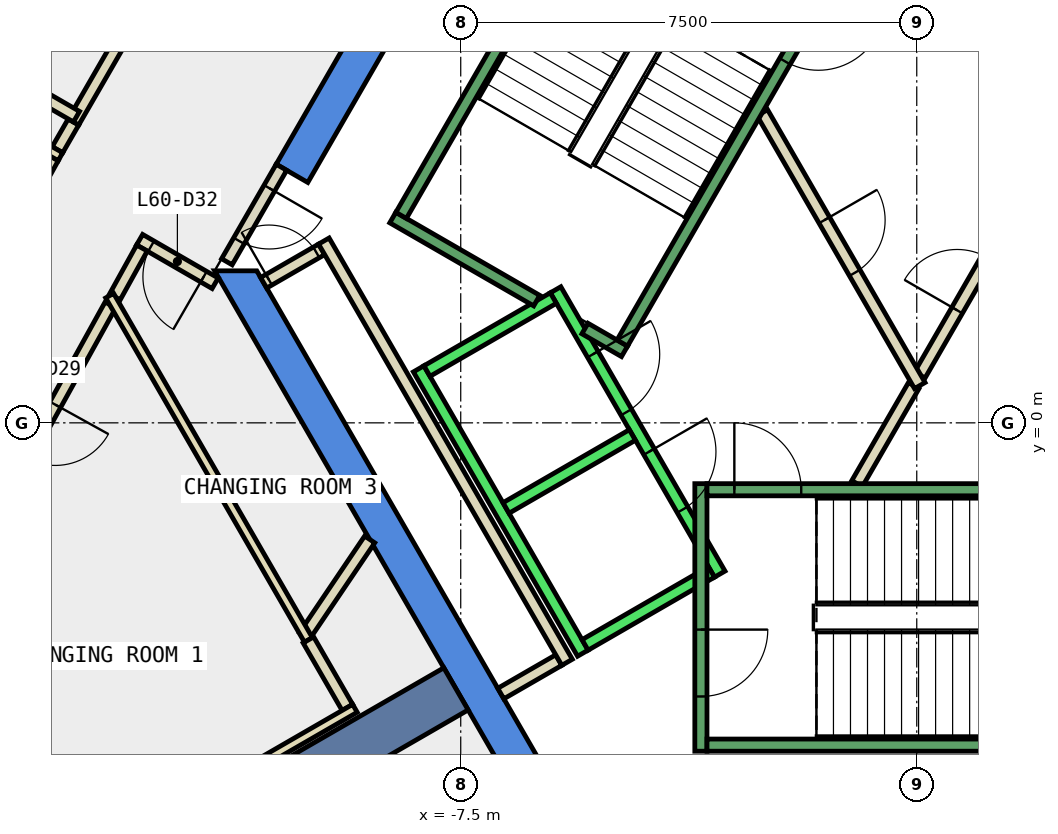
"""IFC4 building model, lengths in metres.
Left out: names, types, materials, properties, quantities, classifications, styles, units other than length and angle.
Written with IfcOpenShell. Run it as: python <this file> out.ifc"""

import sys

from ifc_helpers import new_model, si_unit, direction, frame, frame_2d, origin, place, context, subcontext, project, spatial, polyline, rectangle, outline, extrude, element, fill, save


model = new_model("IFC4")
c1 = context("Model", 3, precision=1e-05, world=origin(), true_north=direction((0.0, 1.0)))
c2 = subcontext(c1, "Body", "Model", "MODEL_VIEW")
j1 = project(units=[si_unit("LENGTHUNIT", "METRE"), si_unit("PLANEANGLEUNIT", "RADIAN")], contexts=[c1])
p1 = place(None, origin())
s1 = spatial("IfcSite", under=j1, at=p1, CompositionType="ELEMENT")
p2 = place(p1, origin())
s2 = spatial("IfcBuilding", under=s1, at=p2, CompositionType="ELEMENT")
p3 = place(p2, frame((0.0, 0.0, 263.0)))
s3 = spatial("IfcBuildingStorey", under=s2, at=p3, CompositionType="ELEMENT", Elevation=263.0)
p4 = place(p3, frame((0.0, 0.0, -0.34)))
e1 = element("IfcWall", 1, at=p4, inside=s3, PredefinedType="SHEAR", context=c2, shape_type="SweptSolid", body=[
    extrude(outline(polyline([(-10.535, 4.253), (-10.015, 3.953), (-5.427, 11.9), (-5.774, 12.5), (-10.535, 4.253)])), origin(), (0.0, 0.0, 1.0), 3.6),
])
p5 = place(p3, frame((0.0, 0.0, -0.34)))
e2 = element("IfcWall", 2, at=p5, inside=s3, PredefinedType="SHEAR", context=c2, shape_type="SweptSolid", body=[
    extrude(outline(polyline([(-11.547, 2.5), (-5.774, -7.5), (-5.427, -6.9), (-10.854, 2.5), (-11.547, 2.5)])), origin(), (0.0, 0.0, 1.0), 3.6),
])
p6 = place(p3, frame((-7.578, -4.375, -0.34), z_axis=(0.0, 0.0, 1.0), x_axis=(-0.866024315419, -0.5000018851, 0.0)))
e3 = element("IfcWall", 3, at=p6, inside=s3, PredefinedType="SHEAR", context=c2, shape_type="SweptSolid", body=[
    extrude(rectangle(XDim=9.0, YDim=0.8, at=frame_2d((4.5, 0.0))), origin(), (0.0, 0.0, 1.0), 3.6),
])
p7 = place(p3, frame((-11.539, 2.295, 0.0), z_axis=(0.0, 0.0, 1.0), x_axis=(-0.866023989838, 0.500002449018, 0.0)))
e4 = element("IfcWall", 4, at=p7, inside=s3, PredefinedType="PARTITIONING", context=c2, shape_type="SweptSolid", body=[
    extrude(rectangle(XDim=1.434, YDim=0.2, at=frame_2d((0.717, 0.0))), origin(), (0.0, 0.0, 1.0), 3.26),
])
p8 = place(p7, frame((0.217, 0.0, 0.0)))
e5 = element("IfcOpeningElement", 5, at=p8, cuts=e4, PredefinedType="OPENING", context=c2, shape_type="SweptSolid", body=[
    extrude(rectangle(XDim=1.0, YDim=2.1, at=frame_2d((0.5, 1.05))), frame((0.0, 0.11, 0.0), z_axis=(0.0, -1.0, 0.0), x_axis=(1.0, 0.0, 0.0)), (0.0, 0.0, 1.0), 0.22),
])
p9 = place(p3, frame((-12.743, 2.875, 0.0), z_axis=(0.0, 0.0, 1.0), x_axis=(-0.484334040176, -0.8748831565, 0.0)))
e6 = element("IfcWall", 6, at=p9, inside=s3, PredefinedType="PARTITIONING", context=c2, shape_type="SweptSolid", body=[
    extrude(rectangle(XDim=0.919, YDim=0.2, at=frame_2d((0.459, 0.0))), origin(), (0.0, 0.0, 1.0), 3.26),
])
p10 = place(p3, frame((-13.261, 1.939, 0.0), z_axis=(0.0, 0.0, 1.0), x_axis=(-0.484323615817, -0.874888927329, 0.0)))
e7 = element("IfcWall", 7, at=p10, inside=s3, PredefinedType="PARTITIONING", context=c2, shape_type="SweptSolid", body=[
    extrude(rectangle(XDim=4.747, YDim=0.2, at=frame_2d((2.374, 0.0))), origin(), (0.0, 0.0, 1.0), 3.26),
])
p11 = place(p10, frame((1.874, 0.0, 0.0)))
e8 = element("IfcOpeningElement", 8, at=p11, cuts=e7, PredefinedType="OPENING", context=c2, shape_type="SweptSolid", body=[
    extrude(rectangle(XDim=1.0, YDim=2.1, at=frame_2d((0.5, 1.05))), frame((0.0, 0.11, 0.0), z_axis=(0.0, -1.0, 0.0), x_axis=(1.0, 0.0, 0.0)), (0.0, 0.0, 1.0), 0.22),
])
p12 = place(p3, frame((-14.132, 4.492, 0.0), z_axis=(0.0, 0.0, 1.0), x_axis=(0.499829488579, 0.86612382622, 0.0)))
e9 = element("IfcWall", 9, at=p12, inside=s3, PredefinedType="PARTITIONING", context=c2, shape_type="SweptSolid", body=[
    extrude(rectangle(XDim=0.527, YDim=0.2, at=frame_2d((0.263, 0.0))), origin(), (0.0, 0.0, 1.0), 3.26),
])
p13 = place(p3, frame((-13.869, 4.948, 0.0), z_axis=(0.0, 0.0, 1.0), x_axis=(0.49994636267, 0.866056369097, 0.0)))
e10 = element("IfcWall", 10, at=p13, inside=s3, PredefinedType="PARTITIONING", context=c2, shape_type="SweptSolid", body=[
    extrude(rectangle(XDim=2.8, YDim=0.2, at=frame_2d((1.4, 0.0))), origin(), (0.0, 0.0, 1.0), 3.26),
])
p14 = place(p3, frame((-15.671, 1.714, 0.0), z_axis=(0.0, 0.0, 1.0), x_axis=(0.484203367026, 0.874955484216, 0.0)))
e11 = element("IfcWall", 11, at=p14, inside=s3, PredefinedType="PARTITIONING", context=c2, shape_type="SweptSolid", body=[
    extrude(rectangle(XDim=3.025, YDim=0.2, at=frame_2d((1.513, 0.0))), origin(), (0.0, 0.0, 1.0), 3.26),
])
p15 = place(p14, frame((1.013, 0.0, 0.0)))
e12 = element("IfcOpeningElement", 12, at=p15, cuts=e11, PredefinedType="OPENING", context=c2, shape_type="SweptSolid", body=[
    extrude(rectangle(XDim=1.0, YDim=2.1, at=frame_2d((0.5, 1.05))), frame((0.0, 0.11, 0.0), z_axis=(0.0, -1.0, 0.0), x_axis=(1.0, 0.0, 0.0)), (0.0, 0.0, 1.0), 0.22),
])
p16 = place(p3, frame((-5.888, -3.902, 0.0), z_axis=(0.0, 0.0, 1.0), x_axis=(-0.86621513555, -0.499671230855, 0.0)))
e13 = element("IfcWall", 13, at=p16, inside=s3, PredefinedType="PARTITIONING", context=c2, shape_type="SweptSolid", body=[
    extrude(rectangle(XDim=1.1, YDim=0.2, at=frame_2d((0.55, 0.0))), origin(), (0.0, 0.0, 1.0), 3.26),
])
p17 = place(p3, frame((-10.741, 2.303, 0.0), z_axis=(0.0, 0.0, 1.0), x_axis=(0.866063652425, 0.499933745558, 0.0)))
e14 = element("IfcWall", 14, at=p17, inside=s3, PredefinedType="PARTITIONING", context=c2, shape_type="SweptSolid", body=[
    extrude(rectangle(XDim=1.1, YDim=0.2, at=frame_2d((0.55, 0.0))), origin(), (0.0, 0.0, 1.0), 3.26),
])
p18 = place(p17, frame((0.1, 0.0, 0.0)))
e15 = element("IfcOpeningElement", 15, at=p18, cuts=e14, PredefinedType="OPENING", context=c2, shape_type="SweptSolid", body=[
    extrude(rectangle(XDim=0.9, YDim=2.1, at=frame_2d((0.45, 1.05))), frame((0.0, 0.11, 0.0), z_axis=(0.0, -1.0, 0.0), x_axis=(1.0, 0.0, 0.0)), (0.0, 0.0, 1.0), 0.22),
])
p19 = place(p3, frame((-9.751, 2.99, 0.0), z_axis=(0.0, 0.0, 1.0), x_axis=(0.500012163284, -0.866018381195, 0.0)))
e16 = element("IfcWall", 16, at=p19, inside=s3, PredefinedType="PARTITIONING", context=c2, shape_type="SweptSolid", body=[
    extrude(rectangle(XDim=8.0, YDim=0.2, at=frame_2d((4.0, 0.0))), origin(), (0.0, 0.0, 1.0), 3.26),
])
p20 = place(p3, frame((-10.069, -3.504, 0.0), z_axis=(0.0, 0.0, 1.0), x_axis=(0.559779346026, 0.828641710127, 0.0)))
e17 = element("IfcWall", 17, at=p20, inside=s3, PredefinedType="PARTITIONING", context=c2, shape_type="SweptSolid", body=[
    extrude(rectangle(XDim=1.915, YDim=0.2, at=frame_2d((0.958, 0.0))), origin(), (0.0, 0.0, 1.0), 3.26),
])
p21 = place(p3, frame((-13.274, 2.092, 0.0), z_axis=(0.0, 0.0, 1.0), x_axis=(0.500002592159, -0.866023907196, 0.0)))
e18 = element("IfcWall", 18, at=p21, inside=s3, PredefinedType="PARTITIONING", context=c2, shape_type="SweptSolid", body=[
    extrude(rectangle(XDim=6.538, YDim=0.15, at=frame_2d((3.269, 0.0))), origin(), (0.0, 0.0, 1.0), 3.26),
])
p22 = place(p3, frame((-0.982, -1.0, 0.0), z_axis=(0.0, 0.0, 1.0), x_axis=(0.50024047865, 0.865886518847, 0.0)))
e19 = element("IfcWall", 19, at=p22, inside=s3, PredefinedType="PARTITIONING", context=c2, shape_type="SweptSolid", body=[
    extrude(rectangle(XDim=1.863, YDim=0.2, at=frame_2d((0.931, 0.0))), origin(), (0.0, 0.0, 1.0), 3.26),
])
p23 = place(p3, frame((0.05, 0.787, 0.0), z_axis=(0.0, 0.0, 1.0), x_axis=(0.499954076797, 0.866051915934, 0.0)))
e20 = element("IfcWall", 20, at=p23, inside=s3, PredefinedType="PARTITIONING", context=c2, shape_type="SweptSolid", body=[
    extrude(rectangle(XDim=3.558, YDim=0.2, at=frame_2d((1.779, 0.0))), origin(), (0.0, 0.0, 1.0), 3.26),
])
p24 = place(p23, frame((1.229, 0.0, 0.0)))
e21 = element("IfcOpeningElement", 21, at=p24, cuts=e20, PredefinedType="OPENING", context=c2, shape_type="SweptSolid", body=[
    extrude(rectangle(XDim=1.0, YDim=2.1, at=frame_2d((0.5, 1.05))), frame((0.0, 0.11, 0.0), z_axis=(0.0, -1.0, 0.0), x_axis=(1.0, 0.0, 0.0)), (0.0, 0.0, 1.0), 0.22),
])
p25 = place(p3, frame((-2.54, 5.1, 0.0), z_axis=(0.0, 0.0, 1.0), x_axis=(0.499925051871, -0.866068670783, 0.0)))
e22 = element("IfcWall", 22, at=p25, inside=s3, PredefinedType="PARTITIONING", context=c2, shape_type="SweptSolid", body=[
    extrude(rectangle(XDim=5.181, YDim=0.2, at=frame_2d((2.59, 0.0))), origin(), (0.0, 0.0, 1.0), 3.26),
])
p26 = place(p25, frame((2.04, 0.0, 0.0)))
e23 = element("IfcOpeningElement", 23, at=p26, cuts=e22, PredefinedType="OPENING", context=c2, shape_type="SweptSolid", body=[
    extrude(rectangle(XDim=1.0, YDim=2.1, at=frame_2d((0.5, 1.05))), frame((0.0, 0.11, 0.0), z_axis=(0.0, -1.0, 0.0), x_axis=(1.0, 0.0, 0.0)), (0.0, 0.0, 1.0), 0.22),
])
p27 = place(p3, frame((-9.364, -4.68, 0.0), z_axis=(0.0, 0.0, 1.0), x_axis=(-0.500052244015, 0.865995238587, 0.0)))
e24 = element("IfcWall", 24, at=p27, inside=s3, PredefinedType="PARTITIONING", context=c2, shape_type="SweptSolid", body=[
    extrude(rectangle(XDim=1.281, YDim=0.2, at=frame_2d((0.641, 0.0))), origin(), (0.0, 0.0, 1.0), 3.26),
])
p28 = place(p3, frame((-9.24, -4.695, 0.0), z_axis=(0.0, 0.0, 1.0), x_axis=(-0.866015037582, -0.500017954359, 0.0)))
e25 = element("IfcWall", 25, at=p28, inside=s3, PredefinedType="PARTITIONING", context=c2, shape_type="SweptSolid", body=[
    extrude(rectangle(XDim=7.176, YDim=0.15, at=frame_2d((3.588, 0.0))), origin(), (0.0, 0.0, 1.0), 3.26),
])
p29 = place(p3, frame((-15.984, 6.285, 0.0), z_axis=(0.0, 0.0, 1.0), x_axis=(0.865998541277, -0.500046524342, 0.0)))
e26 = element("IfcWall", 26, at=p29, inside=s3, PredefinedType="PARTITIONING", context=c2, shape_type="SweptSolid", body=[
    extrude(rectangle(XDim=2.5, YDim=0.2, at=frame_2d((1.25, 0.0))), origin(), (0.0, 0.0, 1.0), 3.26),
])
p30 = place(p3, frame((-14.083, 4.377, 0.0), z_axis=(0.0, 0.0, 1.0), x_axis=(-0.870415885751, 0.492317159799, 0.0)))
e27 = element("IfcWall", 27, at=p30, inside=s3, PredefinedType="PARTITIONING", context=c2, shape_type="SweptSolid", body=[
    extrude(rectangle(XDim=4.581, YDim=0.15, at=frame_2d((2.29, 0.0))), origin(), (0.0, 0.0, 1.0), 3.26),
])
p31 = place(p3, frame((-10.449, 4.203, 0.0), z_axis=(0.0, 0.0, 1.0), x_axis=(-0.499914839587, -0.866074565589, 0.0)))
e28 = element("IfcWall", 28, at=p31, inside=s3, PredefinedType="PARTITIONING", context=c2, shape_type="SweptSolid", body=[
    extrude(rectangle(XDim=1.794, YDim=0.2, at=frame_2d((0.897, 0.0))), origin(), (0.0, 0.0, 1.0), 2.4),
])
p32 = place(p31, frame((0.397, 0.0, 0.0)))
e29 = element("IfcOpeningElement", 29, at=p32, cuts=e28, PredefinedType="OPENING", context=c2, shape_type="SweptSolid", body=[
    extrude(rectangle(XDim=1.0, YDim=2.1, at=frame_2d((0.5, 1.05))), frame((0.0, 0.11, 0.0), z_axis=(0.0, -1.0, 0.0), x_axis=(1.0, 0.0, 0.0)), (0.0, 0.0, 1.0), 0.22),
])
p33 = place(p3, frame((-5.94, 2.188, 0.0), z_axis=(0.0, 0.0, 1.0), x_axis=(0.500034260056, -0.866005622828, 0.0)))
e30 = element("IfcWall", 30, at=p33, inside=s3, PredefinedType="STANDARD", context=c2, shape_type="SweptSolid", body=[
    extrude(rectangle(XDim=5.399, YDim=0.2, at=frame_2d((2.7, 0.0))), origin(), (0.0, 0.0, 1.0), 3.26),
])
p34 = place(p33, frame((3.075, 0.0, 0.0)))
e31 = element("IfcOpeningElement", 31, at=p34, cuts=e30, PredefinedType="OPENING", context=c2, shape_type="SweptSolid", body=[
    extrude(rectangle(XDim=1.1, YDim=2.1, at=frame_2d((0.55, 1.05))), frame((0.0, 0.11, 0.0), z_axis=(0.0, -1.0, 0.0), x_axis=(1.0, 0.0, 0.0)), (0.0, 0.0, 1.0), 0.22),
])
p35 = place(p33, frame((1.225, 0.0, 0.0)))
e32 = element("IfcOpeningElement", 32, at=p35, cuts=e30, PredefinedType="OPENING", context=c2, shape_type="SweptSolid", body=[
    extrude(rectangle(XDim=1.1, YDim=2.1, at=frame_2d((0.55, 1.05))), frame((0.0, 0.11, 0.0), z_axis=(0.0, -1.0, 0.0), x_axis=(1.0, 0.0, 0.0)), (0.0, 0.0, 1.0), 0.22),
])
p36 = place(p3, frame((-8.192, 0.888, 0.0), z_axis=(0.0, 0.0, 1.0), x_axis=(0.500034260056, -0.866005622828, 0.0)))
e33 = element("IfcWall", 33, at=p36, inside=s3, PredefinedType="STANDARD", context=c2, shape_type="SweptSolid", body=[
    extrude(rectangle(XDim=5.399, YDim=0.2, at=frame_2d((2.7, 0.0))), origin(), (0.0, 0.0, 1.0), 3.26),
])
for number, where, z_axis, x_axis in (
    (34, (-5.977, 2.052, 0.0), (0.0, 0.0, 1.0), (-0.866, -0.5, 0.0)),
    (35, (-4.677, -0.2, 0.0), (0.0, 0.0, 1.0), (-0.866, -0.5, 0.0)),
):
    element("IfcWall", number, at=place(p3, frame(where, z_axis=z_axis, x_axis=x_axis)), inside=s3, PredefinedType="STANDARD", context=c2, shape_type="SweptSolid", body=[
        extrude(rectangle(XDim=2.399, YDim=0.2, at=frame_2d((1.2, 0.0))), origin(), (0.0, 0.0, 1.0), 3.26),
    ])
p37 = place(p3, frame((-3.377, -2.452, 0.0), z_axis=(0.0, 0.0, 1.0), x_axis=(-0.865955154139, -0.50012165622, 0.0)))
e36 = element("IfcWall", 36, at=p37, inside=s3, PredefinedType="STANDARD", context=c2, shape_type="SweptSolid", body=[
    extrude(rectangle(XDim=2.4, YDim=0.2, at=frame_2d((1.2, 0.0))), origin(), (0.0, 0.0, 1.0), 3.26),
])
p38 = place(p3, frame((-3.55, -1.0, 0.0), z_axis=(0.0, 0.0, 1.0), x_axis=(0.0, -1.0, 0.0)))
e37 = element("IfcWall", 37, at=p38, inside=s3, PredefinedType="STANDARD", context=c2, shape_type="SweptSolid", body=[
    extrude(rectangle(XDim=4.4, YDim=0.2, at=frame_2d((2.2, 0.0))), origin(), (0.0, 0.0, 1.0), 3.26),
])
p39 = place(p38, frame((2.4, 0.0, 0.0)))
e38 = element("IfcOpeningElement", 38, at=p39, cuts=e37, PredefinedType="OPENING", context=c2, shape_type="SweptSolid", body=[
    extrude(rectangle(XDim=1.1, YDim=2.2, at=frame_2d((0.55, 1.1))), frame((0.0, 0.11, 0.0), z_axis=(0.0, -1.0, 0.0), x_axis=(1.0, 0.0, 0.0)), (0.0, 0.0, 1.0), 0.22),
])
p40 = place(p3, frame((-3.45, -1.1, 0.0), z_axis=(0.0, 0.0, 1.0), x_axis=(1.0, 0.0, 0.0)))
e39 = element("IfcWall", 39, at=p40, inside=s3, PredefinedType="STANDARD", context=c2, shape_type="SweptSolid", body=[
    extrude(rectangle(XDim=6.9, YDim=0.2, at=frame_2d((3.45, 0.0))), origin(), (0.0, 0.0, 1.0), 3.26),
])
p41 = place(p40, frame((0.45, 0.0, 0.0)))
e40 = element("IfcOpeningElement", 40, at=p41, cuts=e39, PredefinedType="OPENING", context=c2, shape_type="SweptSolid", body=[
    extrude(rectangle(XDim=1.1, YDim=2.2, at=frame_2d((0.55, 1.1))), frame((0.0, 0.11, 0.0), z_axis=(0.0, -1.0, 0.0), x_axis=(1.0, 0.0, 0.0)), (0.0, 0.0, 1.0), 0.22),
])
p42 = place(p3, frame((-3.45, -5.3, 0.0), z_axis=(0.0, 0.0, 1.0), x_axis=(1.0, 0.0, 0.0)))
e41 = element("IfcWall", 41, at=p42, inside=s3, PredefinedType="STANDARD", context=c2, shape_type="SweptSolid", body=[
    extrude(rectangle(XDim=6.9, YDim=0.2, at=frame_2d((3.45, 0.0))), origin(), (0.0, 0.0, 1.0), 3.26),
])
p43 = place(p3, frame((-6.25, 2.01, 0.0), z_axis=(0.0, 0.0, 1.0), x_axis=(-0.86611865017, 0.499838457731, 0.0)))
e42 = element("IfcWall", 42, at=p43, inside=s3, PredefinedType="STANDARD", context=c2, shape_type="SweptSolid", body=[
    extrude(rectangle(XDim=2.733, YDim=0.2, at=frame_2d((1.366, 0.0))), origin(), (0.0, 0.0, 1.0), 3.26),
])
p44 = place(p3, frame((-4.806, 1.176, 0.0), z_axis=(0.0, 0.0, 1.0), x_axis=(-0.866558586415, 0.499075361355, 0.0)))
e43 = element("IfcWall", 43, at=p44, inside=s3, PredefinedType="STANDARD", context=c2, shape_type="SweptSolid", body=[
    extrude(rectangle(XDim=0.751, YDim=0.2, at=frame_2d((0.376, 0.0))), origin(), (0.0, 0.0, 1.0), 3.26),
])
p45 = place(p3, frame((-1.393, 7.288, 0.0), z_axis=(0.0, 0.0, 1.0), x_axis=(-0.499963383562, -0.866046543262, 0.0)))
e44 = element("IfcWall", 44, at=p45, inside=s3, PredefinedType="STANDARD", context=c2, shape_type="SweptSolid", body=[
    extrude(rectangle(XDim=6.9, YDim=0.2, at=frame_2d((3.45, 0.0))), origin(), (0.0, 0.0, 1.0), 3.26),
])
p46 = place(p45, frame((0.45, 0.0, 0.0)))
e45 = element("IfcOpeningElement", 45, at=p46, cuts=e44, PredefinedType="OPENING", context=c2, shape_type="SweptSolid", body=[
    extrude(rectangle(XDim=1.1, YDim=2.2, at=frame_2d((0.55, 1.1))), frame((0.0, 0.11, 0.0), z_axis=(0.0, -1.0, 0.0), x_axis=(1.0, 0.0, 0.0)), (0.0, 0.0, 1.0), 0.22),
])
p47 = place(p3, frame((-5.03, 9.388, 0.0), z_axis=(0.0, 0.0, 1.0), x_axis=(-0.499978703459, -0.866037698999, 0.0)))
e46 = element("IfcWall", 46, at=p47, inside=s3, PredefinedType="STANDARD", context=c2, shape_type="SweptSolid", body=[
    extrude(rectangle(XDim=6.9, YDim=0.2, at=frame_2d((3.45, 0.0))), origin(), (0.0, 0.0, 1.0), 3.26),
])
p48 = place(p11, origin())
e47 = element("IfcDoor", 47, at=p48, inside=s3, OperationType="SINGLE_SWING_LEFT", PredefinedType="DOOR", context=c2, shape_type="SweptSolid", body=[
    extrude(rectangle(XDim=1.0, YDim=2.1, at=frame_2d((0.5, 1.05))), frame((0.0, 0.025, 0.0), z_axis=(0.0, -1.0, 0.0), x_axis=(1.0, 0.0, 0.0)), (0.0, 0.0, 1.0), 0.05),
])
fill(e8, e47)
p49 = place(p8, origin())
e48 = element("IfcDoor", 48, at=p49, inside=s3, OperationType="SINGLE_SWING_RIGHT", PredefinedType="DOOR", context=c2, shape_type="SweptSolid", body=[
    extrude(rectangle(XDim=1.0, YDim=2.1, at=frame_2d((0.5, 1.05))), frame((0.0, 0.025, 0.0), z_axis=(0.0, -1.0, 0.0), x_axis=(1.0, 0.0, 0.0)), (0.0, 0.0, 1.0), 0.05),
])
fill(e5, e48)
p50 = place(p24, origin())
e49 = element("IfcDoor", 49, at=p50, inside=s3, OperationType="SINGLE_SWING_RIGHT", PredefinedType="DOOR", context=c2, shape_type="SweptSolid", body=[
    extrude(rectangle(XDim=1.0, YDim=2.1, at=frame_2d((0.5, 1.05))), frame((0.0, 0.025, 0.0), z_axis=(0.0, -1.0, 0.0), x_axis=(1.0, 0.0, 0.0)), (0.0, 0.0, 1.0), 0.05),
])
fill(e21, e49)
p51 = place(p26, origin())
e50 = element("IfcDoor", 50, at=p51, inside=s3, OperationType="SINGLE_SWING_RIGHT", PredefinedType="DOOR", context=c2, shape_type="SweptSolid", body=[
    extrude(rectangle(XDim=1.0, YDim=2.1, at=frame_2d((0.5, 1.05))), frame((0.0, 0.025, 0.0), z_axis=(0.0, -1.0, 0.0), x_axis=(1.0, 0.0, 0.0)), (0.0, 0.0, 1.0), 0.05),
])
fill(e23, e50)
p52 = place(p18, origin())
e51 = element("IfcDoor", 51, at=p52, inside=s3, OperationType="SINGLE_SWING_RIGHT", PredefinedType="DOOR", context=c2, shape_type="SweptSolid", body=[
    extrude(rectangle(XDim=0.9, YDim=2.1, at=frame_2d((0.45, 1.05))), frame((0.0, 0.025, 0.0), z_axis=(0.0, -1.0, 0.0), x_axis=(1.0, 0.0, 0.0)), (0.0, 0.0, 1.0), 0.05),
])
fill(e15, e51)
p53 = place(p32, origin())
e52 = element("IfcDoor", 52, at=p53, inside=s3, OperationType="SINGLE_SWING_LEFT", PredefinedType="DOOR", context=c2, shape_type="SweptSolid", body=[
    extrude(rectangle(XDim=1.0, YDim=2.1, at=frame_2d((0.5, 1.05))), frame((0.0, 0.025, 0.0), z_axis=(0.0, -1.0, 0.0), x_axis=(1.0, 0.0, 0.0)), (0.0, 0.0, 1.0), 0.05),
])
fill(e29, e52)
p54 = place(p34, origin())
e53 = element("IfcDoor", 53, at=p54, inside=s3, OperationType="SLIDING_TO_LEFT", PredefinedType="DOOR", context=c2, shape_type="SweptSolid", body=[
    extrude(rectangle(XDim=1.1, YDim=2.1, at=frame_2d((0.55, 1.05))), frame((0.0, 0.025, 0.0), z_axis=(0.0, -1.0, 0.0), x_axis=(1.0, 0.0, 0.0)), (0.0, 0.0, 1.0), 0.05),
])
fill(e31, e53)
p55 = place(p35, origin())
e54 = element("IfcDoor", 54, at=p55, inside=s3, OperationType="SLIDING_TO_LEFT", PredefinedType="DOOR", context=c2, shape_type="SweptSolid", body=[
    extrude(rectangle(XDim=1.1, YDim=2.1, at=frame_2d((0.55, 1.05))), frame((0.0, 0.025, 0.0), z_axis=(0.0, -1.0, 0.0), x_axis=(1.0, 0.0, 0.0)), (0.0, 0.0, 1.0), 0.05),
])
fill(e32, e54)
p56 = place(p41, origin())
e55 = element("IfcDoor", 55, at=p56, inside=s3, OperationType="SINGLE_SWING_LEFT", PredefinedType="DOOR", context=c2, shape_type="SweptSolid", body=[
    extrude(rectangle(XDim=1.1, YDim=2.2, at=frame_2d((0.55, 1.1))), frame((0.0, 0.025, 0.0), z_axis=(0.0, -1.0, 0.0), x_axis=(1.0, 0.0, 0.0)), (0.0, 0.0, 1.0), 0.05),
])
fill(e40, e55)
p57 = place(p39, origin())
e56 = element("IfcDoor", 56, at=p57, inside=s3, OperationType="SINGLE_SWING_LEFT", PredefinedType="DOOR", context=c2, shape_type="SweptSolid", body=[
    extrude(rectangle(XDim=1.1, YDim=2.2, at=frame_2d((0.55, 1.1))), frame((0.0, 0.025, 0.0), z_axis=(0.0, -1.0, 0.0), x_axis=(1.0, 0.0, 0.0)), (0.0, 0.0, 1.0), 0.05),
])
fill(e38, e56)
p58 = place(p46, origin())
e57 = element("IfcDoor", 57, at=p58, inside=s3, OperationType="SINGLE_SWING_LEFT", PredefinedType="DOOR", context=c2, shape_type="SweptSolid", body=[
    extrude(rectangle(XDim=1.1, YDim=2.2, at=frame_2d((0.55, 1.1))), frame((0.0, 0.025, 0.0), z_axis=(0.0, -1.0, 0.0), x_axis=(1.0, 0.0, 0.0)), (0.0, 0.0, 1.0), 0.05),
])
fill(e45, e57)
save(model, sys.argv[1])
